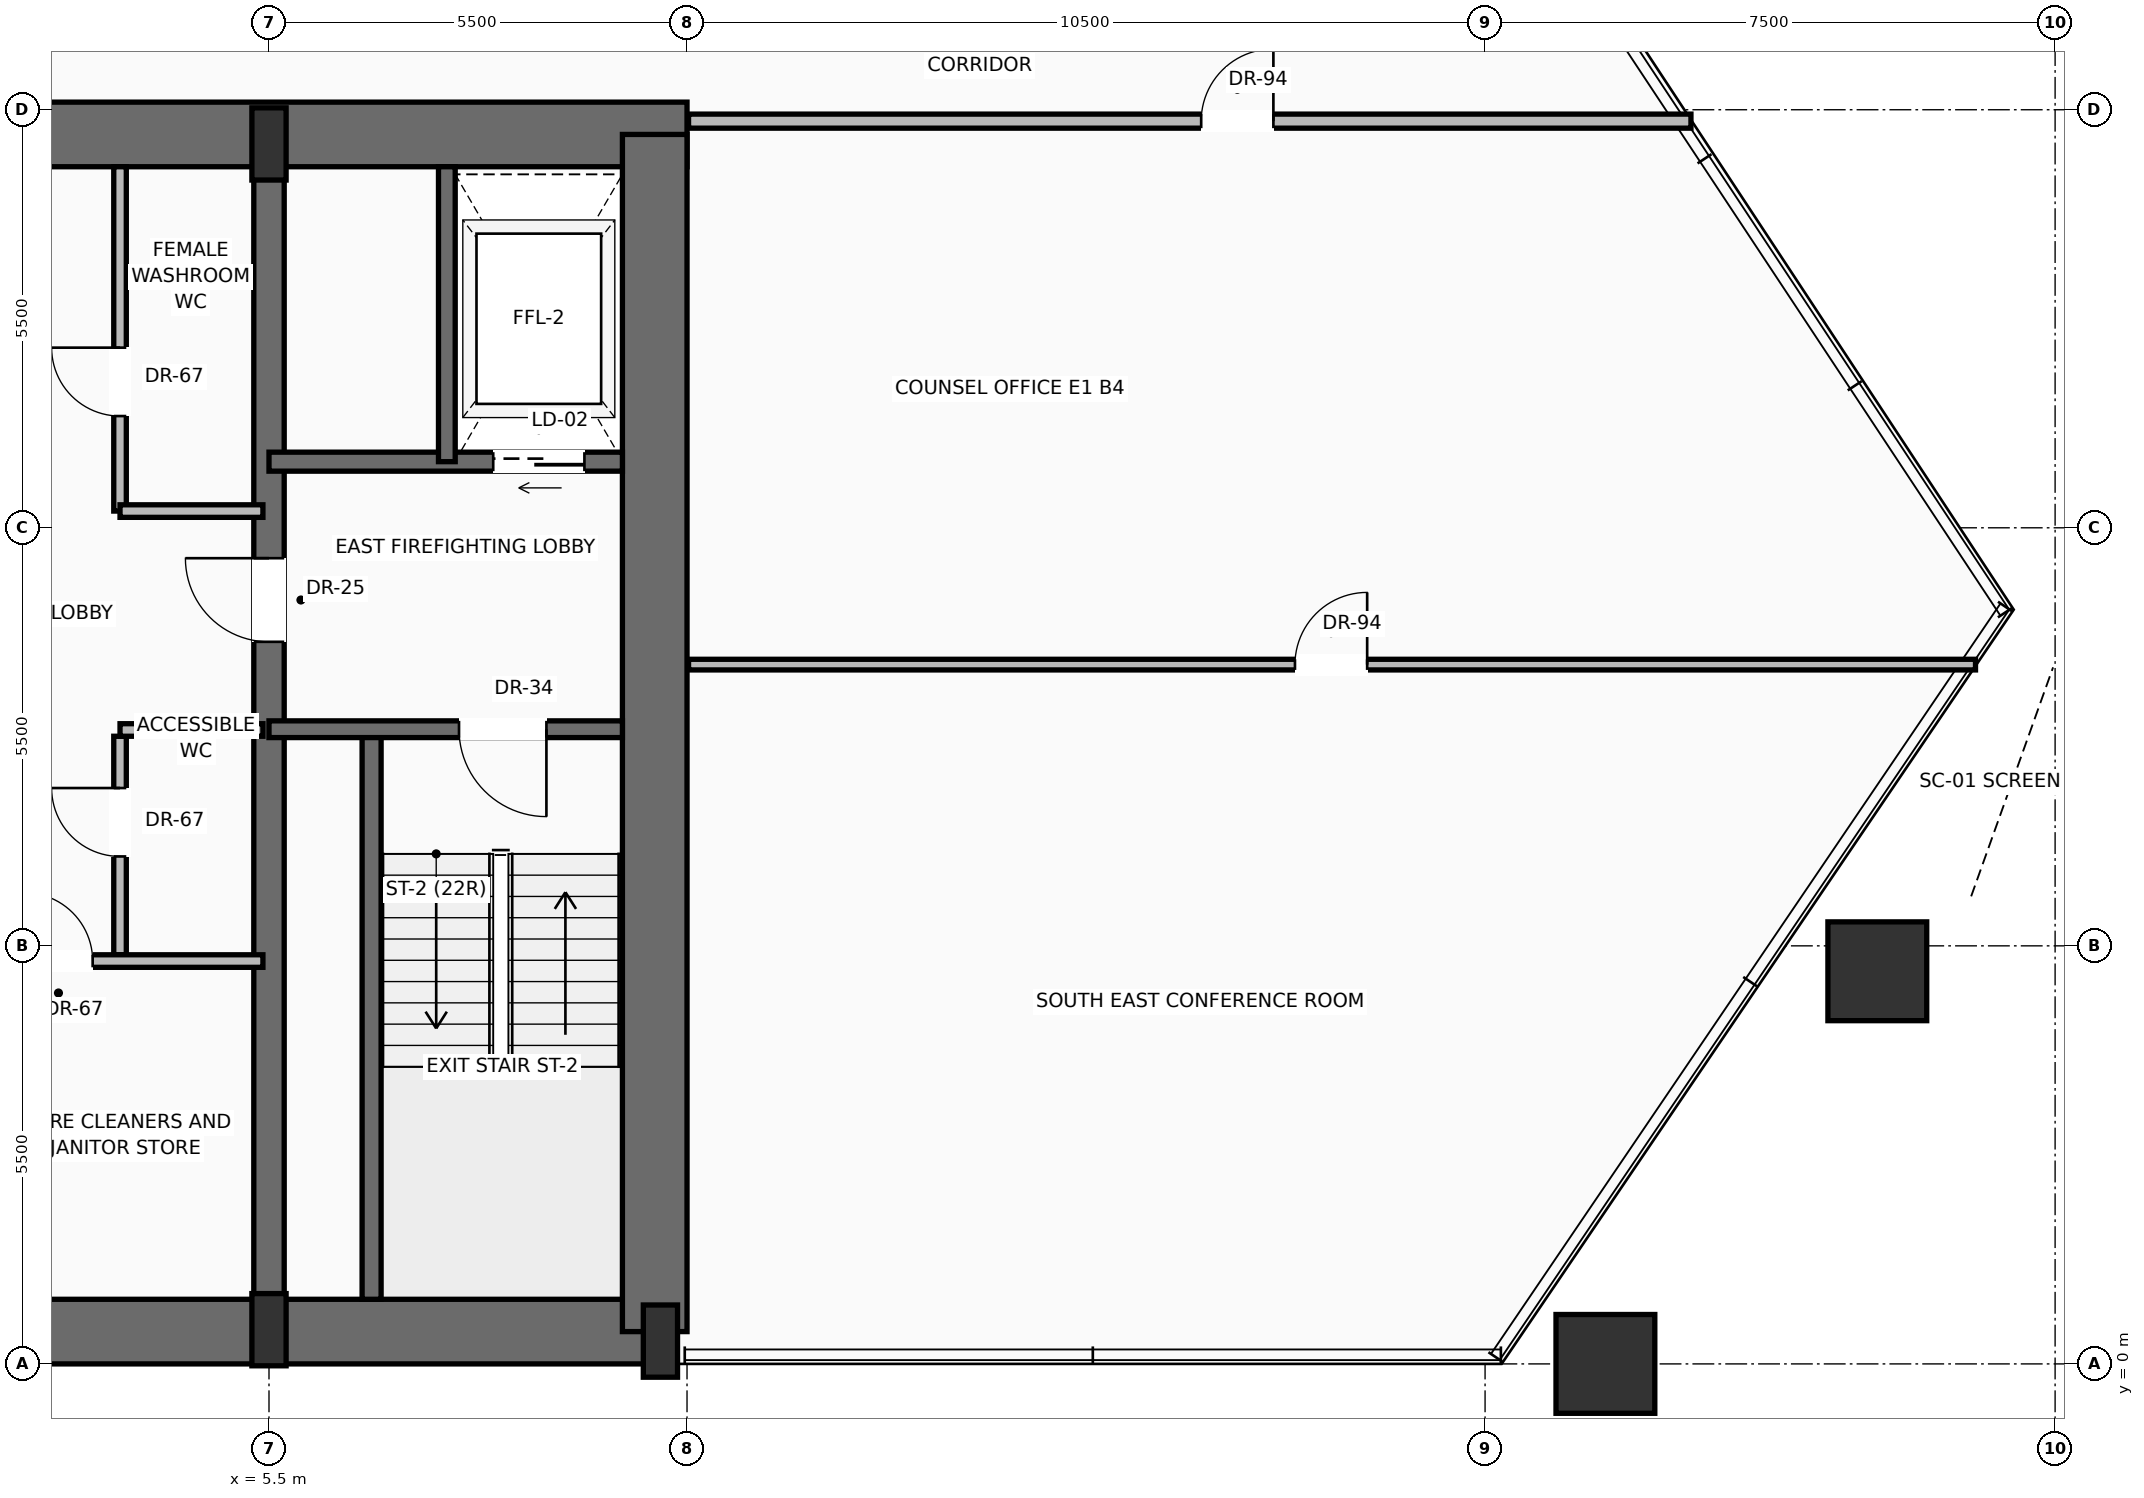
"""IFC4 building model, lengths in metres.
Left out: names, types, materials, properties, quantities, classifications, styles, units other than length and angle.
Written with IfcOpenShell. Run it as: python <this file> out.ifc"""

import sys

from ifc_helpers import new_model, si_unit, direction, frame, frame_2d, origin, origin_2d, place, context, subcontext, project, spatial, rectangle, hollow_rectangle, extrude, source, transform, mapped, element, fill, save


model = new_model("IFC4")
c1 = context("Model", 3, precision=1e-05, world=origin(), true_north=direction((0.0, 1.0)))
c2 = subcontext(c1, "Body", "Model", "MODEL_VIEW")
j1 = project(units=[si_unit("LENGTHUNIT", "METRE"), si_unit("PLANEANGLEUNIT", "RADIAN")], contexts=[c1])
p1 = place(None, origin())
s1 = spatial("IfcSite", under=j1, at=p1, CompositionType="ELEMENT")
p2 = place(p1, origin())
s2 = spatial("IfcBuilding", under=s1, at=p2, CompositionType="ELEMENT")
p3 = place(p2, frame((0.0, 0.0, 68.2)))
s3 = spatial("IfcBuildingStorey", under=s2, at=p3, CompositionType="ELEMENT", Elevation=68.2)
p4 = place(p3, frame((-10.65, 0.425, 0.0), z_axis=(0.0, 0.0, 1.0), x_axis=(1.0, 0.0, 0.0)))
e1 = element("IfcWall", 1, at=p4, inside=s3, PredefinedType="SHEAR", context=c2, shape_type="SweptSolid", body=[
    extrude(rectangle(XDim=21.3, YDim=0.85, at=frame_2d((10.65, 0.0))), origin(), (0.0, 0.0, 1.0), 3.4),
])
p5 = place(p3, frame((-11.0, 16.175, 0.0), z_axis=(0.0, 0.0, 1.0), x_axis=(1.0, 0.0, 0.0)))
e2 = element("IfcWall", 2, at=p5, inside=s3, PredefinedType="SHEAR", context=c2, shape_type="SweptSolid", body=[
    extrude(rectangle(XDim=22.0, YDim=0.85, at=frame_2d((11.0, 0.0))), origin(), (0.0, 0.0, 1.0), 3.4),
])
p6 = place(p5, frame((3.57, 0.0, 0.0)))
e3 = element("IfcOpeningElement", 3, at=p6, cuts=e2, PredefinedType="OPENING", context=c2, shape_type="SweptSolid", body=[
    extrude(rectangle(XDim=1.3, YDim=2.3, at=frame_2d((0.65, 1.15))), frame((0.0, 0.435, 0.0), z_axis=(0.0, -1.0, 0.0), x_axis=(1.0, 0.0, 0.0)), (0.0, 0.0, 1.0), 0.87),
])
p7 = place(p5, frame((10.0, 0.0, 0.0)))
e4 = element("IfcOpeningElement", 4, at=p7, cuts=e2, PredefinedType="OPENING", context=c2, shape_type="SweptSolid", body=[
    extrude(rectangle(XDim=2.0, YDim=2.4, at=frame_2d((1.0, 1.2))), frame((0.0, 0.435, 0.0), z_axis=(0.0, -1.0, 0.0), x_axis=(1.0, 0.0, 0.0)), (0.0, 0.0, 1.0), 0.87),
])
p8 = place(p3, frame((10.575, 0.425, 0.0), z_axis=(0.0, 0.0, 1.0), x_axis=(0.0, 1.0, 0.0)))
e5 = element("IfcWall", 5, at=p8, inside=s3, PredefinedType="SHEAR", context=c2, shape_type="SweptSolid", body=[
    extrude(rectangle(XDim=15.75, YDim=0.85, at=frame_2d((7.875, 0.0))), origin(), (0.0, 0.0, 1.0), 3.4),
])
p9 = place(p3, frame((5.5, 0.425, 0.0), z_axis=(0.0, 0.0, 1.0), x_axis=(0.0, 1.0, 0.0)))
e6 = element("IfcWall", 6, at=p9, inside=s3, PredefinedType="SHEAR", context=c2, shape_type="SweptSolid", body=[
    extrude(rectangle(XDim=15.75, YDim=0.4, at=frame_2d((7.875, 0.0))), origin(), (0.0, 0.0, 1.0), 3.4),
])
p10 = place(p9, frame((9.075, 0.0, 0.0)))
e7 = element("IfcOpeningElement", 7, at=p10, cuts=e6, PredefinedType="OPENING", context=c2, shape_type="SweptSolid", body=[
    extrude(rectangle(XDim=1.1, YDim=2.2, at=frame_2d((0.55, 1.1))), frame((0.0, 0.21, 0.0), z_axis=(0.0, -1.0, 0.0), x_axis=(1.0, 0.0, 0.0)), (0.0, 0.0, 1.0), 0.42),
])
m1 = source(origin(), c2, "Body", "SweptSolid", [
    extrude(rectangle(XDim=0.45, YDim=0.95, at=origin_2d()), origin(), (0.0, 0.0, 1.0), 3.7),
])
for number, where, z_axis, x_axis in (
    (8, (5.5, 0.45, 0.0), (0.0, 0.0, 1.0), (1.0, 0.0, 0.0)),
    (9, (10.65, 0.3, 0.0), (0.0, 0.0, 1.0), (1.0, 0.0, 0.0)),
    (10, (5.5, 16.05, 0.0), (0.0, 0.0, 1.0), (1.0, 0.0, 0.0)),
):
    element("IfcColumn", number, at=place(p3, frame(where, z_axis=z_axis, x_axis=x_axis)), inside=s3, PredefinedType="PILASTER", context=c2, shape_type="MappedRepresentation", body=[
        mapped(m1, transform((0.0, 0.0, 0.0), scale=1.0)),
    ])
m2 = source(origin(), c2, "Body", "SweptSolid", [
    extrude(hollow_rectangle(XDim=1.3, YDim=1.3, WallThickness=0.065, at=origin_2d()), origin(), (0.0, 0.0, 1.0), 3.691),
])
p11 = place(p3, frame((23.083, 0.0, 0.004), z_axis=(0.014020713106, 0.0, 0.999901704971), x_axis=(0.0, 1.0, 0.0)))
e11 = element("IfcColumn", 11, at=p11, inside=s3, PredefinedType="COLUMN", context=c2, shape_type="MappedRepresentation", body=[
    mapped(m2, transform((0.0, 0.0, 0.0), scale=1.0)),
])
m3 = source(origin(), c2, "Body", "SweptSolid", [
    extrude(hollow_rectangle(XDim=1.3, YDim=1.3, WallThickness=0.065, at=origin_2d()), origin(), (0.0, 0.0, 1.0), 3.692),
])
p12 = place(p3, frame((26.661, 5.166, 0.004), z_axis=(0.001917856829, -0.016334849548, 0.99986473811), x_axis=(0.993178023772, 0.116607946111, 0.0)))
e12 = element("IfcColumn", 12, at=p12, inside=s3, PredefinedType="COLUMN", context=c2, shape_type="MappedRepresentation", body=[
    mapped(m3, transform((0.0, 0.0, 0.0), scale=1.0)),
])
p13 = place(p3, frame((6.85, 0.85, 0.0), z_axis=(0.0, 0.0, 1.0), x_axis=(0.0, 1.0, 0.0)))
e13 = element("IfcWall", 13, at=p13, inside=s3, PredefinedType="SOLIDWALL", context=c2, shape_type="SweptSolid", body=[
    extrude(rectangle(XDim=7.5, YDim=0.25, at=frame_2d((3.75, 0.0))), origin(), (0.0, 0.0, 1.0), 3.4),
])
p14 = place(p3, frame((10.15, 8.35, 0.0), z_axis=(0.0, 0.0, 1.0), x_axis=(-1.0, 0.0, 0.0)))
e14 = element("IfcWall", 14, at=p14, inside=s3, PredefinedType="SOLIDWALL", context=c2, shape_type="SweptSolid", body=[
    extrude(rectangle(XDim=4.65, YDim=0.22, at=frame_2d((2.325, 0.0))), origin(), (0.0, 0.0, 1.0), 3.4),
])
p15 = place(p14, frame((1.0, 0.0, 0.0)))
e15 = element("IfcOpeningElement", 15, at=p15, cuts=e14, PredefinedType="OPENING", context=c2, shape_type="SweptSolid", body=[
    extrude(rectangle(XDim=1.15, YDim=2.2, at=frame_2d((0.575, 1.1))), frame((0.0, 0.12, 0.0), z_axis=(0.0, -1.0, 0.0), x_axis=(1.0, 0.0, 0.0)), (0.0, 0.0, 1.0), 0.24),
])
p16 = place(p3, frame((10.15, 11.87, 0.0), z_axis=(0.0, 0.0, 1.0), x_axis=(-1.0, 0.0, 0.0)))
e16 = element("IfcWall", 16, at=p16, inside=s3, PredefinedType="SOLIDWALL", context=c2, shape_type="SweptSolid", body=[
    extrude(rectangle(XDim=4.65, YDim=0.25, at=frame_2d((2.325, 0.0))), origin(), (0.0, 0.0, 1.0), 3.4),
])
p17 = place(p16, frame((0.5, 0.0, 0.0)))
e17 = element("IfcOpeningElement", 17, at=p17, cuts=e16, PredefinedType="OPENING", context=c2, shape_type="SweptSolid", body=[
    extrude(rectangle(XDim=1.2, YDim=2.25, at=frame_2d((0.6, 1.125))), frame((0.0, 0.135, 0.0), z_axis=(0.0, -1.0, 0.0), x_axis=(1.0, 0.0, 0.0)), (0.0, 0.0, 1.0), 0.27),
])
p18 = place(p3, frame((7.84, 11.87, 0.0), z_axis=(0.0, 0.0, 1.0), x_axis=(0.0, 1.0, 0.0)))
e18 = element("IfcWall", 18, at=p18, inside=s3, PredefinedType="SOLIDWALL", context=c2, shape_type="SweptSolid", body=[
    extrude(rectangle(XDim=3.88, YDim=0.22, at=frame_2d((1.94, 0.0))), origin(), (0.0, 0.0, 1.0), 3.4),
])
p19 = place(p3, frame((3.54, 5.383, 0.0), z_axis=(0.0, 0.0, 1.0), x_axis=(0.0, 1.0, 0.0)))
e19 = element("IfcWall", 19, at=p19, inside=s3, PredefinedType="PARTITIONING", context=c2, shape_type="SweptSolid", body=[
    extrude(rectangle(XDim=2.875, YDim=0.165, at=frame_2d((1.438, 0.0))), origin(), (0.0, 0.0, 1.0), 3.392),
])
p20 = place(p19, frame((1.294, 0.0, 0.0)))
e20 = element("IfcOpeningElement", 20, at=p20, cuts=e19, PredefinedType="OPENING", context=c2, shape_type="SweptSolid", body=[
    extrude(rectangle(XDim=0.9, YDim=2.1, at=frame_2d((0.45, 1.05))), frame((0.0, 0.093, 0.0), z_axis=(0.0, -1.0, 0.0), x_axis=(1.0, 0.0, 0.0)), (0.0, 0.0, 1.0), 0.185),
])
p21 = place(p3, frame((3.54, 8.34, 0.0), z_axis=(0.0, 0.0, 1.0), x_axis=(1.0, 0.0, 0.0)))
e21 = element("IfcWall", 21, at=p21, inside=s3, PredefinedType="PARTITIONING", context=c2, shape_type="SweptSolid", body=[
    extrude(rectangle(XDim=1.88, YDim=0.165, at=frame_2d((0.94, 0.0))), origin(), (0.0, 0.0, 1.0), 3.392),
])
p22 = place(p3, frame((1.8, 5.3, 0.0), z_axis=(0.0, 0.0, 1.0), x_axis=(1.0, 0.0, 0.0)))
e22 = element("IfcWall", 22, at=p22, inside=s3, PredefinedType="PARTITIONING", context=c2, shape_type="SweptSolid", body=[
    extrude(rectangle(XDim=3.62, YDim=0.165, at=frame_2d((1.81, 0.0))), origin(), (0.0, 0.0, 1.0), 3.392),
])
p23 = place(p22, frame((0.48, 0.0, 0.0)))
e23 = element("IfcOpeningElement", 23, at=p23, cuts=e22, PredefinedType="OPENING", context=c2, shape_type="SweptSolid", body=[
    extrude(rectangle(XDim=0.9, YDim=2.1, at=frame_2d((0.45, 1.05))), frame((0.0, 0.093, 0.0), z_axis=(0.0, -1.0, 0.0), x_axis=(1.0, 0.0, 0.0)), (0.0, 0.0, 1.0), 0.185),
])
p24 = place(p3, frame((3.54, 11.22, 0.0), z_axis=(0.0, 0.0, 1.0), x_axis=(0.0, 1.0, 0.0)))
e24 = element("IfcWall", 24, at=p24, inside=s3, PredefinedType="PARTITIONING", context=c2, shape_type="SweptSolid", body=[
    extrude(rectangle(XDim=4.53, YDim=0.165, at=frame_2d((2.265, 0.0))), origin(), (0.0, 0.0, 1.0), 3.392),
])
p25 = place(p24, frame((1.25, 0.0, 0.0)))
e25 = element("IfcOpeningElement", 25, at=p25, cuts=e24, PredefinedType="OPENING", context=c2, shape_type="SweptSolid", body=[
    extrude(rectangle(XDim=0.9, YDim=2.1, at=frame_2d((0.45, 1.05))), frame((0.0, 0.093, 0.0), z_axis=(0.0, -1.0, 0.0), x_axis=(1.0, 0.0, 0.0)), (0.0, 0.0, 1.0), 0.185),
])
p26 = place(p3, frame((3.54, 11.22, 0.0), z_axis=(0.0, 0.0, 1.0), x_axis=(1.0, 0.0, 0.0)))
e26 = element("IfcWall", 26, at=p26, inside=s3, PredefinedType="PARTITIONING", context=c2, shape_type="SweptSolid", body=[
    extrude(rectangle(XDim=1.88, YDim=0.165, at=frame_2d((0.94, 0.0))), origin(), (0.0, 0.0, 1.0), 3.392),
])
p27 = place(p3, frame((11.02, 16.35, 0.0), z_axis=(0.0, 0.0, 1.0), x_axis=(1.0, 0.0, 0.0)))
e27 = element("IfcWall", 27, at=p27, inside=s3, PredefinedType="PARTITIONING", context=c2, shape_type="SweptSolid", body=[
    extrude(rectangle(XDim=13.189, YDim=0.185, at=frame_2d((6.594, 0.0))), origin(), (0.0, 0.0, 1.0), 2.697),
])
p28 = place(p27, frame((6.745, 0.0, 0.0)))
e28 = element("IfcOpeningElement", 28, at=p28, cuts=e27, PredefinedType="OPENING", context=c2, shape_type="SweptSolid", body=[
    extrude(rectangle(XDim=0.95, YDim=2.2, at=frame_2d((0.475, 1.1))), frame((0.0, 0.103, 0.0), z_axis=(0.0, -1.0, 0.0), x_axis=(1.0, 0.0, 0.0)), (0.0, 0.0, 1.0), 0.205),
])
p29 = place(p3, frame((11.02, 9.2, 0.0), z_axis=(0.0, 0.0, 1.0), x_axis=(1.0, 0.0, 0.0)))
e29 = element("IfcWall", 29, at=p29, inside=s3, PredefinedType="PARTITIONING", context=c2, shape_type="SweptSolid", body=[
    extrude(rectangle(XDim=16.933, YDim=0.14, at=frame_2d((8.466, 0.0))), origin(), (0.0, 0.0, 1.0), 3.392),
])
p30 = place(p29, frame((7.979, 0.0, 0.0)))
e30 = element("IfcOpeningElement", 30, at=p30, cuts=e29, PredefinedType="OPENING", context=c2, shape_type="SweptSolid", body=[
    extrude(rectangle(XDim=0.95, YDim=2.2, at=frame_2d((0.475, 1.1))), frame((0.0, 0.08, 0.0), z_axis=(0.0, -1.0, 0.0), x_axis=(1.0, 0.0, 0.0)), (0.0, 0.0, 1.0), 0.16),
])
m4 = source(origin(), c2, "Body", "SweptSolid", [
    extrude(rectangle(XDim=1.15, YDim=2.2, at=frame_2d((0.575, 1.1))), frame((0.0, 0.025, 0.0), z_axis=(0.0, -1.0, 0.0), x_axis=(1.0, 0.0, 0.0)), (0.0, 0.0, 1.0), 0.05),
])
p31 = place(p15, origin())
e31 = element("IfcDoor", 31, at=p31, inside=s3, OperationType="SINGLE_SWING_LEFT", PredefinedType="DOOR", context=c2, shape_type="MappedRepresentation", body=[
    mapped(m4, transform((0.0, 0.0, 0.0), scale=1.0)),
])
fill(e15, e31)
m5 = source(origin(), c2, "Body", "SweptSolid", [
    extrude(rectangle(XDim=1.1, YDim=2.2, at=frame_2d((0.55, 1.1))), frame((0.0, 0.025, 0.0), z_axis=(0.0, -1.0, 0.0), x_axis=(1.0, 0.0, 0.0)), (0.0, 0.0, 1.0), 0.05),
])
p32 = place(p10, origin())
e32 = element("IfcDoor", 32, at=p32, inside=s3, OperationType="SINGLE_SWING_RIGHT", PredefinedType="DOOR", context=c2, shape_type="MappedRepresentation", body=[
    mapped(m5, transform((0.0, 0.0, 0.0), scale=1.0)),
])
fill(e7, e32)
m6 = source(origin(), c2, "Body", "SweptSolid", [
    extrude(rectangle(XDim=1.2, YDim=2.25, at=frame_2d((0.6, 1.125))), frame((0.0, 0.025, 0.0), z_axis=(0.0, -1.0, 0.0), x_axis=(1.0, 0.0, 0.0)), (0.0, 0.0, 1.0), 0.05),
])
p33 = place(p17, origin())
e33 = element("IfcDoor", 33, at=p33, inside=s3, OperationType="SLIDING_TO_RIGHT", PredefinedType="DOOR", context=c2, shape_type="MappedRepresentation", body=[
    mapped(m6, transform((0.0, 0.0, 0.0), scale=1.0)),
])
fill(e17, e33)
m7 = source(origin(), c2, "Body", "SweptSolid", [
    extrude(rectangle(XDim=0.9, YDim=2.1, at=frame_2d((0.45, 1.05))), frame((0.0, 0.025, 0.0), z_axis=(0.0, -1.0, 0.0), x_axis=(1.0, 0.0, 0.0)), (0.0, 0.0, 1.0), 0.05),
])
p34 = place(p23, origin())
e34 = element("IfcDoor", 34, at=p34, inside=s3, OperationType="SINGLE_SWING_LEFT", PredefinedType="DOOR", context=c2, shape_type="MappedRepresentation", body=[
    mapped(m7, transform((0.0, 0.0, 0.0), scale=1.0)),
])
fill(e23, e34)
p35 = place(p20, origin())
e35 = element("IfcDoor", 35, at=p35, inside=s3, OperationType="SINGLE_SWING_RIGHT", PredefinedType="DOOR", context=c2, shape_type="MappedRepresentation", body=[
    mapped(m7, transform((0.0, 0.0, 0.0), scale=1.0)),
])
fill(e20, e35)
p36 = place(p25, origin())
e36 = element("IfcDoor", 36, at=p36, inside=s3, OperationType="SINGLE_SWING_RIGHT", PredefinedType="DOOR", context=c2, shape_type="MappedRepresentation", body=[
    mapped(m7, transform((0.0, 0.0, 0.0), scale=1.0)),
])
fill(e25, e36)
m8 = source(origin(), c2, "Body", "SweptSolid", [
    extrude(rectangle(XDim=0.95, YDim=2.2, at=frame_2d((0.475, 1.1))), frame((0.0, 0.025, 0.0), z_axis=(0.0, -1.0, 0.0), x_axis=(1.0, 0.0, 0.0)), (0.0, 0.0, 1.0), 0.05),
])
p37 = place(p28, origin())
e37 = element("IfcDoor", 37, at=p37, inside=s3, OperationType="SINGLE_SWING_RIGHT", PredefinedType="DOOR", context=c2, shape_type="MappedRepresentation", body=[
    mapped(m8, transform((0.0, 0.0, 0.0), scale=1.0)),
])
fill(e28, e37)
p38 = place(p30, origin())
e38 = element("IfcDoor", 38, at=p38, inside=s3, OperationType="SINGLE_SWING_RIGHT", PredefinedType="DOOR", context=c2, shape_type="MappedRepresentation", body=[
    mapped(m8, transform((0.0, 0.0, 0.0), scale=1.0)),
])
fill(e30, e38)
save(model, sys.argv[1])
